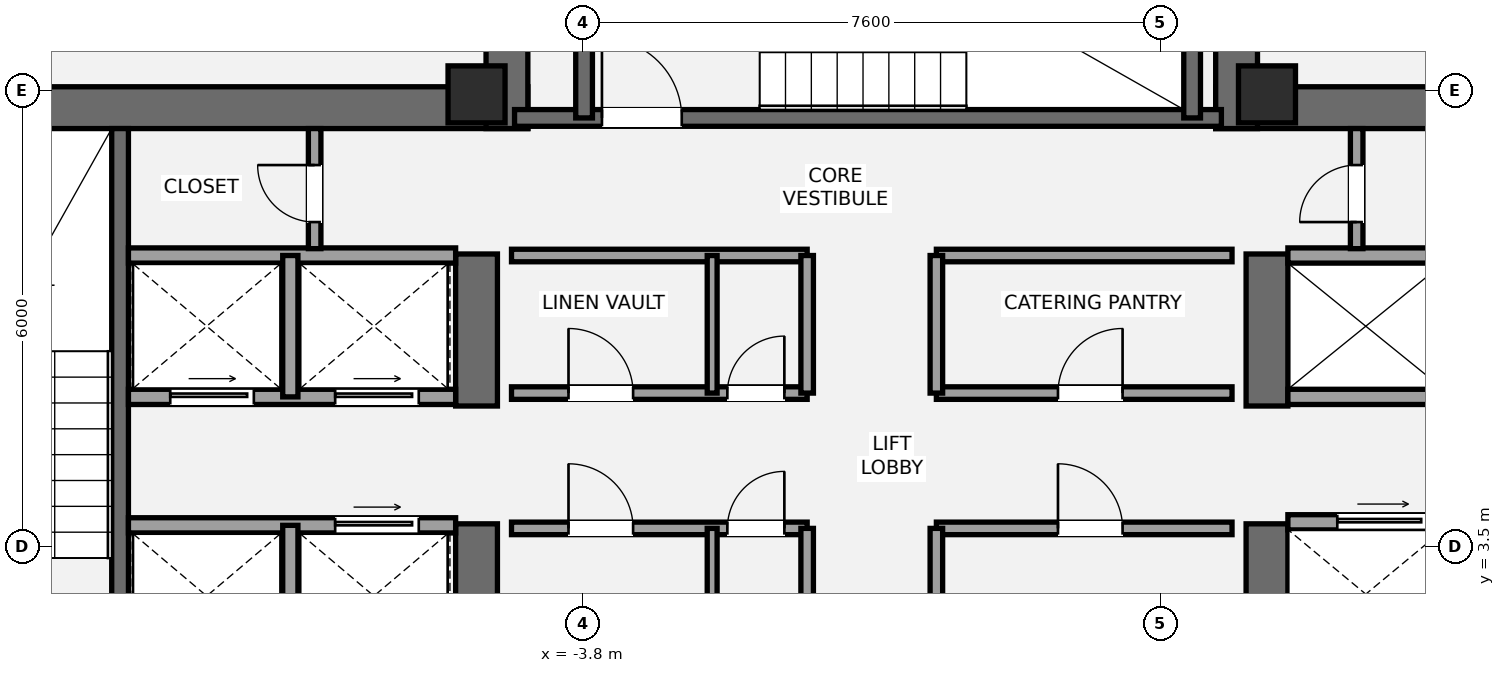
"""IFC4 building model, lengths in metres.
Left out: names, types, materials, properties, quantities, classifications, styles, units other than length and angle.
Written with IfcOpenShell. Run it as: python <this file> out.ifc"""

import sys

from ifc_helpers import new_model, si_unit, direction, frame, frame_2d, origin, origin_2d, place, context, subcontext, project, spatial, rectangle, extrude, element, fill, save


model = new_model("IFC4")
c1 = context("Model", 3, precision=1e-05, world=origin(), true_north=direction((0.0, 1.0)))
c2 = subcontext(c1, "Body", "Model", "MODEL_VIEW")
j1 = project(units=[si_unit("LENGTHUNIT", "METRE"), si_unit("PLANEANGLEUNIT", "RADIAN")], contexts=[c1])
p1 = place(None, origin())
s1 = spatial("IfcSite", under=j1, at=p1, CompositionType="ELEMENT")
p2 = place(p1, origin())
s2 = spatial("IfcBuilding", under=s1, at=p2, CompositionType="ELEMENT")
p3 = place(p2, frame((0.0, 0.0, 241.5)))
s3 = spatial("IfcBuildingStorey", under=s2, at=p3, CompositionType="ELEMENT", Elevation=241.5)
p4 = place(p3, frame((-13.7, 9.275, 0.0), z_axis=(0.0, 0.0, 1.0), x_axis=(1.0, 0.0, 0.0)))
e1 = element("IfcWall", 1, at=p4, inside=s3, PredefinedType="SHEAR", context=c2, shape_type="SweptSolid", body=[
    extrude(rectangle(XDim=9.175, YDim=0.55, at=frame_2d((4.587, 0.0))), origin(), (0.0, 0.0, 1.0), 3.15),
])
p5 = place(p3, frame((-5.2, 1.3, 0.0), z_axis=(0.0, 0.0, 1.0), x_axis=(0.0, 1.0, 0.0)))
e2 = element("IfcWall", 2, at=p5, inside=s3, PredefinedType="SHEAR", context=c2, shape_type="SweptSolid", body=[
    extrude(rectangle(XDim=2.5, YDim=0.55, at=frame_2d((1.25, 0.0))), origin(), (0.0, 0.0, 1.0), 3.15),
])
p6 = place(p3, frame((-5.2, 5.35, 0.0), z_axis=(0.0, 0.0, 1.0), x_axis=(0.0, 1.0, 0.0)))
e3 = element("IfcWall", 3, at=p6, inside=s3, PredefinedType="SHEAR", context=c2, shape_type="SweptSolid", body=[
    extrude(rectangle(XDim=2.0, YDim=0.55, at=frame_2d((1.0, 0.0))), origin(), (0.0, 0.0, 1.0), 3.15),
])
p7 = place(p3, frame((-9.89, 1.85, 0.0), z_axis=(0.0, 0.0, 1.0), x_axis=(0.0, 1.0, 0.0)))
e4 = element("IfcWall", 4, at=p7, inside=s3, PredefinedType="SHEAR", context=c2, shape_type="SweptSolid", body=[
    extrude(rectangle(XDim=7.15, YDim=0.22, at=frame_2d((3.575, 0.0))), origin(), (0.0, 0.0, 1.0), 3.15),
])
p8 = place(p3, frame((4.525, 9.275, 0.0), z_axis=(0.0, 0.0, 1.0), x_axis=(1.0, 0.0, 0.0)))
e5 = element("IfcWall", 5, at=p8, inside=s3, PredefinedType="SHEAR", context=c2, shape_type="SweptSolid", body=[
    extrude(rectangle(XDim=9.175, YDim=0.55, at=frame_2d((4.587, 0.0))), origin(), (0.0, 0.0, 1.0), 3.15),
])
p9 = place(p3, frame((5.2, 1.3, 0.0), z_axis=(0.0, 0.0, 1.0), x_axis=(0.0, 1.0, 0.0)))
e6 = element("IfcWall", 6, at=p9, inside=s3, PredefinedType="SHEAR", context=c2, shape_type="SweptSolid", body=[
    extrude(rectangle(XDim=2.5, YDim=0.55, at=frame_2d((1.25, 0.0))), origin(), (0.0, 0.0, 1.0), 3.15),
])
p10 = place(p3, frame((5.2, 5.35, 0.0), z_axis=(0.0, 0.0, 1.0), x_axis=(0.0, 1.0, 0.0)))
e7 = element("IfcWall", 7, at=p10, inside=s3, PredefinedType="SHEAR", context=c2, shape_type="SweptSolid", body=[
    extrude(rectangle(XDim=2.0, YDim=0.55, at=frame_2d((1.0, 0.0))), origin(), (0.0, 0.0, 1.0), 3.15),
])
for number, where, z_axis, x_axis in (
    (8, (-4.8, 9.0, 0.0), (0.0, 0.0, 1.0), (0.0, 1.0, 0.0)),
    (9, (4.8, 9.0, 0.0), (0.0, 0.0, 1.0), (0.0, 1.0, 0.0)),
):
    element("IfcWall", number, at=place(p3, frame(where, z_axis=z_axis, x_axis=x_axis)), inside=s3, PredefinedType="SHEAR", context=c2, shape_type="SweptSolid", body=[
        extrude(rectangle(XDim=3.95, YDim=0.55, at=frame_2d((1.975, 0.0))), origin(), (0.0, 0.0, 1.0), 3.15),
    ])
p11 = place(p3, frame((-4.7, 9.14, 0.0), z_axis=(0.0, 0.0, 1.0), x_axis=(1.0, 0.0, 0.0)))
e10 = element("IfcWall", 10, at=p11, inside=s3, PredefinedType="SHEAR", context=c2, shape_type="SweptSolid", body=[
    extrude(rectangle(XDim=9.3, YDim=0.22, at=frame_2d((4.65, 0.0))), origin(), (0.0, 0.0, 1.0), 3.15),
])
p12 = place(p11, frame((1.15, 0.0, 0.0)))
e11 = element("IfcOpeningElement", 11, at=p12, cuts=e10, PredefinedType="OPENING", context=c2, shape_type="SweptSolid", body=[
    extrude(rectangle(XDim=1.05, YDim=2.15, at=frame_2d((0.525, 1.075))), frame((0.0, 0.12, 0.0), z_axis=(0.0, -1.0, 0.0), x_axis=(1.0, 0.0, 0.0)), (0.0, 0.0, 1.0), 0.24),
])
for number, where, z_axis, x_axis in (
    (12, (-3.785, 9.14, 0.0), (0.0, 0.0, 1.0), (0.0, 1.0, 0.0)),
    (13, (4.215, 9.14, 0.0), (0.0, 0.0, 1.0), (0.0, 1.0, 0.0)),
):
    element("IfcWall", number, at=place(p3, frame(where, z_axis=z_axis, x_axis=x_axis)), inside=s3, PredefinedType="SHEAR", context=c2, shape_type="SweptSolid", body=[
        extrude(rectangle(XDim=3.26, YDim=0.22, at=frame_2d((1.63, 0.0))), origin(), (0.0, 0.0, 1.0), 3.15),
    ])
for number, where, z_axis, x_axis in (
    (14, (-5.2, 9.45, 0.0), (0.0, 0.0, 1.0), (1.0, 0.0, 0.0)),
    (15, (5.2, 9.45, 0.0), (0.0, 0.0, 1.0), (1.0, 0.0, 0.0)),
):
    element("IfcColumn", number, at=place(p3, frame(where, z_axis=z_axis, x_axis=x_axis)), inside=s3, PredefinedType="PILASTER", context=c2, shape_type="SweptSolid", body=[
        extrude(rectangle(XDim=0.75, YDim=0.75, at=origin_2d()), origin(), (0.0, 0.0, 1.0), 3.15),
    ])
p13 = place(p3, frame((-9.78, 3.78, 0.0), z_axis=(0.0, 0.0, 1.0), x_axis=(1.0, 0.0, 0.0)))
e16 = element("IfcWall", 16, at=p13, inside=s3, PredefinedType="SOLIDWALL", context=c2, shape_type="SweptSolid", body=[
    extrude(rectangle(XDim=4.305, YDim=0.2, at=frame_2d((2.152, 0.0))), origin(), (0.0, 0.0, 1.0), 2.97),
])
p14 = place(p13, frame((2.72, 0.0, 0.0)))
e17 = element("IfcOpeningElement", 17, at=p14, cuts=e16, PredefinedType="OPENING", context=c2, shape_type="SweptSolid", body=[
    extrude(rectangle(XDim=1.1, YDim=2.2, at=frame_2d((0.55, 1.1))), frame((0.0, 0.11, 0.0), z_axis=(0.0, -1.0, 0.0), x_axis=(1.0, 0.0, 0.0)), (0.0, 0.0, 1.0), 0.22),
])
p15 = place(p3, frame((-7.65, 1.85, 0.0), z_axis=(0.0, 0.0, 1.0), x_axis=(0.0, 1.0, 0.0)))
e18 = element("IfcWall", 18, at=p15, inside=s3, PredefinedType="SOLIDWALL", context=c2, shape_type="SweptSolid", body=[
    extrude(rectangle(XDim=1.93, YDim=0.2, at=frame_2d((0.965, 0.0))), origin(), (0.0, 0.0, 1.0), 2.97),
])
p16 = place(p3, frame((-9.78, 5.47, 0.0), z_axis=(0.0, 0.0, 1.0), x_axis=(1.0, 0.0, 0.0)))
e19 = element("IfcWall", 19, at=p16, inside=s3, PredefinedType="SOLIDWALL", context=c2, shape_type="SweptSolid", body=[
    extrude(rectangle(XDim=4.305, YDim=0.2, at=frame_2d((2.152, 0.0))), origin(), (0.0, 0.0, 1.0), 2.97),
])
p17 = place(p16, frame((0.55, 0.0, 0.0)))
e20 = element("IfcOpeningElement", 20, at=p17, cuts=e19, PredefinedType="OPENING", context=c2, shape_type="SweptSolid", body=[
    extrude(rectangle(XDim=1.1, YDim=2.2, at=frame_2d((0.55, 1.1))), frame((0.0, 0.11, 0.0), z_axis=(0.0, -1.0, 0.0), x_axis=(1.0, 0.0, 0.0)), (0.0, 0.0, 1.0), 0.22),
])
p18 = place(p16, frame((2.72, 0.0, 0.0)))
e21 = element("IfcOpeningElement", 21, at=p18, cuts=e19, PredefinedType="OPENING", context=c2, shape_type="SweptSolid", body=[
    extrude(rectangle(XDim=1.1, YDim=2.2, at=frame_2d((0.55, 1.1))), frame((0.0, 0.11, 0.0), z_axis=(0.0, -1.0, 0.0), x_axis=(1.0, 0.0, 0.0)), (0.0, 0.0, 1.0), 0.22),
])
p19 = place(p3, frame((-9.78, 7.33, 0.0), z_axis=(0.0, 0.0, 1.0), x_axis=(1.0, 0.0, 0.0)))
e22 = element("IfcWall", 22, at=p19, inside=s3, PredefinedType="SOLIDWALL", context=c2, shape_type="SweptSolid", body=[
    extrude(rectangle(XDim=4.305, YDim=0.2, at=frame_2d((2.152, 0.0))), origin(), (0.0, 0.0, 1.0), 2.97),
])
p20 = place(p3, frame((-7.65, 5.47, 0.0), z_axis=(0.0, 0.0, 1.0), x_axis=(0.0, 1.0, 0.0)))
e23 = element("IfcWall", 23, at=p20, inside=s3, PredefinedType="SOLIDWALL", context=c2, shape_type="SweptSolid", body=[
    extrude(rectangle(XDim=1.86, YDim=0.2, at=frame_2d((0.93, 0.0))), origin(), (0.0, 0.0, 1.0), 2.97),
])
p21 = place(p3, frame((5.475, 3.82, 0.0), z_axis=(0.0, 0.0, 1.0), x_axis=(1.0, 0.0, 0.0)))
e24 = element("IfcWall", 24, at=p21, inside=s3, PredefinedType="SOLIDWALL", context=c2, shape_type="SweptSolid", body=[
    extrude(rectangle(XDim=4.305, YDim=0.2, at=frame_2d((2.152, 0.0))), origin(), (0.0, 0.0, 1.0), 2.97),
])
p22 = place(p21, frame((0.65, 0.0, 0.0)))
e25 = element("IfcOpeningElement", 25, at=p22, cuts=e24, PredefinedType="OPENING", context=c2, shape_type="SweptSolid", body=[
    extrude(rectangle(XDim=1.2, YDim=2.2, at=frame_2d((0.6, 1.1))), frame((0.0, 0.11, 0.0), z_axis=(0.0, -1.0, 0.0), x_axis=(1.0, 0.0, 0.0)), (0.0, 0.0, 1.0), 0.22),
])
for number, where, z_axis, x_axis in (
    (26, (5.475, 5.47, 0.0), (0.0, 0.0, 1.0), (1.0, 0.0, 0.0)),
    (27, (5.475, 7.33, 0.0), (0.0, 0.0, 1.0), (1.0, 0.0, 0.0)),
):
    element("IfcWall", number, at=place(p3, frame(where, z_axis=z_axis, x_axis=x_axis)), inside=s3, PredefinedType="SOLIDWALL", context=c2, shape_type="SweptSolid", body=[
        extrude(rectangle(XDim=4.305, YDim=0.2, at=frame_2d((2.152, 0.0))), origin(), (0.0, 0.0, 1.0), 2.97),
    ])
p23 = place(p3, frame((-4.74, 3.74, 0.0), z_axis=(0.0, 0.0, 1.0), x_axis=(1.0, 0.0, 0.0)))
e28 = element("IfcWall", 28, at=p23, inside=s3, PredefinedType="PARTITIONING", context=c2, shape_type="SweptSolid", body=[
    extrude(rectangle(XDim=3.89, YDim=0.165, at=frame_2d((1.945, 0.0))), origin(), (0.0, 0.0, 1.0), 2.97),
])
p24 = place(p23, frame((0.75, 0.0, 0.0)))
e29 = element("IfcOpeningElement", 29, at=p24, cuts=e28, PredefinedType="OPENING", context=c2, shape_type="SweptSolid", body=[
    extrude(rectangle(XDim=0.85, YDim=2.1, at=frame_2d((0.425, 1.05))), frame((0.0, 0.093, 0.0), z_axis=(0.0, -1.0, 0.0), x_axis=(1.0, 0.0, 0.0)), (0.0, 0.0, 1.0), 0.185),
])
p25 = place(p23, frame((2.84, 0.0, 0.0)))
e30 = element("IfcOpeningElement", 30, at=p25, cuts=e28, PredefinedType="OPENING", context=c2, shape_type="SweptSolid", body=[
    extrude(rectangle(XDim=0.75, YDim=2.1, at=frame_2d((0.375, 1.05))), frame((0.0, 0.093, 0.0), z_axis=(0.0, -1.0, 0.0), x_axis=(1.0, 0.0, 0.0)), (0.0, 0.0, 1.0), 0.185),
])
p26 = place(p3, frame((-0.85, 1.92, 0.0), z_axis=(0.0, 0.0, 1.0), x_axis=(0.0, 1.0, 0.0)))
e31 = element("IfcWall", 31, at=p26, inside=s3, PredefinedType="PARTITIONING", context=c2, shape_type="SweptSolid", body=[
    extrude(rectangle(XDim=1.82, YDim=0.165, at=frame_2d((0.91, 0.0))), origin(), (0.0, 0.0, 1.0), 2.97),
])
p27 = place(p3, frame((0.85, 3.74, 0.0), z_axis=(0.0, 0.0, 1.0), x_axis=(1.0, 0.0, 0.0)))
e32 = element("IfcWall", 32, at=p27, inside=s3, PredefinedType="PARTITIONING", context=c2, shape_type="SweptSolid", body=[
    extrude(rectangle(XDim=3.89, YDim=0.165, at=frame_2d((1.945, 0.0))), origin(), (0.0, 0.0, 1.0), 2.97),
])
p28 = place(p27, frame((1.6, 0.0, 0.0)))
e33 = element("IfcOpeningElement", 33, at=p28, cuts=e32, PredefinedType="OPENING", context=c2, shape_type="SweptSolid", body=[
    extrude(rectangle(XDim=0.85, YDim=2.1, at=frame_2d((0.425, 1.05))), frame((0.0, 0.093, 0.0), z_axis=(0.0, -1.0, 0.0), x_axis=(1.0, 0.0, 0.0)), (0.0, 0.0, 1.0), 0.185),
])
p29 = place(p3, frame((0.85, 1.92, 0.0), z_axis=(0.0, 0.0, 1.0), x_axis=(0.0, 1.0, 0.0)))
e34 = element("IfcWall", 34, at=p29, inside=s3, PredefinedType="PARTITIONING", context=c2, shape_type="SweptSolid", body=[
    extrude(rectangle(XDim=1.82, YDim=0.165, at=frame_2d((0.91, 0.0))), origin(), (0.0, 0.0, 1.0), 2.97),
])
p30 = place(p3, frame((-2.1, 1.92, 0.0), z_axis=(0.0, 0.0, 1.0), x_axis=(0.0, 1.0, 0.0)))
e35 = element("IfcWall", 35, at=p30, inside=s3, PredefinedType="PARTITIONING", context=c2, shape_type="SweptSolid", body=[
    extrude(rectangle(XDim=1.82, YDim=0.13, at=frame_2d((0.91, 0.0))), origin(), (0.0, 0.0, 1.0), 2.97),
])
p31 = place(p3, frame((-4.74, 5.52, 0.0), z_axis=(0.0, 0.0, 1.0), x_axis=(1.0, 0.0, 0.0)))
e36 = element("IfcWall", 36, at=p31, inside=s3, PredefinedType="PARTITIONING", context=c2, shape_type="SweptSolid", body=[
    extrude(rectangle(XDim=3.89, YDim=0.165, at=frame_2d((1.945, 0.0))), origin(), (0.0, 0.0, 1.0), 2.97),
])
p32 = place(p31, frame((0.75, 0.0, 0.0)))
e37 = element("IfcOpeningElement", 37, at=p32, cuts=e36, PredefinedType="OPENING", context=c2, shape_type="SweptSolid", body=[
    extrude(rectangle(XDim=0.85, YDim=2.1, at=frame_2d((0.425, 1.05))), frame((0.0, 0.093, 0.0), z_axis=(0.0, -1.0, 0.0), x_axis=(1.0, 0.0, 0.0)), (0.0, 0.0, 1.0), 0.185),
])
p33 = place(p31, frame((2.84, 0.0, 0.0)))
e38 = element("IfcOpeningElement", 38, at=p33, cuts=e36, PredefinedType="OPENING", context=c2, shape_type="SweptSolid", body=[
    extrude(rectangle(XDim=0.75, YDim=2.1, at=frame_2d((0.375, 1.05))), frame((0.0, 0.093, 0.0), z_axis=(0.0, -1.0, 0.0), x_axis=(1.0, 0.0, 0.0)), (0.0, 0.0, 1.0), 0.185),
])
p34 = place(p3, frame((-4.74, 7.33, 0.0), z_axis=(0.0, 0.0, 1.0), x_axis=(1.0, 0.0, 0.0)))
e39 = element("IfcWall", 39, at=p34, inside=s3, PredefinedType="PARTITIONING", context=c2, shape_type="SweptSolid", body=[
    extrude(rectangle(XDim=3.89, YDim=0.165, at=frame_2d((1.945, 0.0))), origin(), (0.0, 0.0, 1.0), 2.97),
])
p35 = place(p3, frame((-0.85, 5.52, 0.0), z_axis=(0.0, 0.0, 1.0), x_axis=(0.0, 1.0, 0.0)))
e40 = element("IfcWall", 40, at=p35, inside=s3, PredefinedType="PARTITIONING", context=c2, shape_type="SweptSolid", body=[
    extrude(rectangle(XDim=1.81, YDim=0.165, at=frame_2d((0.905, 0.0))), origin(), (0.0, 0.0, 1.0), 2.97),
])
p36 = place(p3, frame((0.85, 5.52, 0.0), z_axis=(0.0, 0.0, 1.0), x_axis=(1.0, 0.0, 0.0)))
e41 = element("IfcWall", 41, at=p36, inside=s3, PredefinedType="PARTITIONING", context=c2, shape_type="SweptSolid", body=[
    extrude(rectangle(XDim=3.89, YDim=0.165, at=frame_2d((1.945, 0.0))), origin(), (0.0, 0.0, 1.0), 2.97),
])
p37 = place(p36, frame((1.6, 0.0, 0.0)))
e42 = element("IfcOpeningElement", 42, at=p37, cuts=e41, PredefinedType="OPENING", context=c2, shape_type="SweptSolid", body=[
    extrude(rectangle(XDim=0.85, YDim=2.1, at=frame_2d((0.425, 1.05))), frame((0.0, 0.093, 0.0), z_axis=(0.0, -1.0, 0.0), x_axis=(1.0, 0.0, 0.0)), (0.0, 0.0, 1.0), 0.185),
])
p38 = place(p3, frame((0.85, 7.33, 0.0), z_axis=(0.0, 0.0, 1.0), x_axis=(1.0, 0.0, 0.0)))
e43 = element("IfcWall", 43, at=p38, inside=s3, PredefinedType="PARTITIONING", context=c2, shape_type="SweptSolid", body=[
    extrude(rectangle(XDim=3.89, YDim=0.165, at=frame_2d((1.945, 0.0))), origin(), (0.0, 0.0, 1.0), 2.97),
])
p39 = place(p3, frame((0.85, 5.52, 0.0), z_axis=(0.0, 0.0, 1.0), x_axis=(0.0, 1.0, 0.0)))
e44 = element("IfcWall", 44, at=p39, inside=s3, PredefinedType="PARTITIONING", context=c2, shape_type="SweptSolid", body=[
    extrude(rectangle(XDim=1.81, YDim=0.165, at=frame_2d((0.905, 0.0))), origin(), (0.0, 0.0, 1.0), 2.97),
])
p40 = place(p3, frame((-2.1, 5.52, 0.0), z_axis=(0.0, 0.0, 1.0), x_axis=(0.0, 1.0, 0.0)))
e45 = element("IfcWall", 45, at=p40, inside=s3, PredefinedType="PARTITIONING", context=c2, shape_type="SweptSolid", body=[
    extrude(rectangle(XDim=1.81, YDim=0.13, at=frame_2d((0.905, 0.0))), origin(), (0.0, 0.0, 1.0), 2.97),
])
p41 = place(p3, frame((-7.33, 7.42, 0.0), z_axis=(0.0, 0.0, 1.0), x_axis=(0.0, 1.0, 0.0)))
e46 = element("IfcWall", 46, at=p41, inside=s3, PredefinedType="PARTITIONING", context=c2, shape_type="SweptSolid", body=[
    extrude(rectangle(XDim=1.58, YDim=0.165, at=frame_2d((0.79, 0.0))), origin(), (0.0, 0.0, 1.0), 2.97),
])
p42 = place(p41, frame((0.35, 0.0, 0.0)))
e47 = element("IfcOpeningElement", 47, at=p42, cuts=e46, PredefinedType="OPENING", context=c2, shape_type="SweptSolid", body=[
    extrude(rectangle(XDim=0.75, YDim=2.1, at=frame_2d((0.375, 1.05))), frame((0.0, 0.093, 0.0), z_axis=(0.0, -1.0, 0.0), x_axis=(1.0, 0.0, 0.0)), (0.0, 0.0, 1.0), 0.185),
])
p43 = place(p3, frame((6.38, 7.42, 0.0), z_axis=(0.0, 0.0, 1.0), x_axis=(0.0, 1.0, 0.0)))
e48 = element("IfcWall", 48, at=p43, inside=s3, PredefinedType="PARTITIONING", context=c2, shape_type="SweptSolid", body=[
    extrude(rectangle(XDim=1.58, YDim=0.165, at=frame_2d((0.79, 0.0))), origin(), (0.0, 0.0, 1.0), 2.97),
])
p44 = place(p43, frame((0.35, 0.0, 0.0)))
e49 = element("IfcOpeningElement", 49, at=p44, cuts=e48, PredefinedType="OPENING", context=c2, shape_type="SweptSolid", body=[
    extrude(rectangle(XDim=0.75, YDim=2.1, at=frame_2d((0.375, 1.05))), frame((0.0, 0.093, 0.0), z_axis=(0.0, -1.0, 0.0), x_axis=(1.0, 0.0, 0.0)), (0.0, 0.0, 1.0), 0.185),
])
p45 = place(p12, origin())
e50 = element("IfcDoor", 50, at=p45, inside=s3, OperationType="SINGLE_SWING_LEFT", PredefinedType="DOOR", context=c2, shape_type="SweptSolid", body=[
    extrude(rectangle(XDim=1.05, YDim=2.15, at=frame_2d((0.525, 1.075))), frame((0.0, 0.025, 0.0), z_axis=(0.0, -1.0, 0.0), x_axis=(1.0, 0.0, 0.0)), (0.0, 0.0, 1.0), 0.05),
])
fill(e11, e50)
p46 = place(p17, origin())
e51 = element("IfcDoor", 51, at=p46, inside=s3, OperationType="SLIDING_TO_LEFT", PredefinedType="DOOR", context=c2, shape_type="SweptSolid", body=[
    extrude(rectangle(XDim=1.1, YDim=2.2, at=frame_2d((0.55, 1.1))), frame((0.0, 0.025, 0.0), z_axis=(0.0, -1.0, 0.0), x_axis=(1.0, 0.0, 0.0)), (0.0, 0.0, 1.0), 0.05),
])
fill(e20, e51)
p47 = place(p18, origin())
e52 = element("IfcDoor", 52, at=p47, inside=s3, OperationType="SLIDING_TO_LEFT", PredefinedType="DOOR", context=c2, shape_type="SweptSolid", body=[
    extrude(rectangle(XDim=1.1, YDim=2.2, at=frame_2d((0.55, 1.1))), frame((0.0, 0.025, 0.0), z_axis=(0.0, -1.0, 0.0), x_axis=(1.0, 0.0, 0.0)), (0.0, 0.0, 1.0), 0.05),
])
fill(e21, e52)
p48 = place(p14, origin())
e53 = element("IfcDoor", 53, at=p48, inside=s3, OperationType="SLIDING_TO_LEFT", PredefinedType="DOOR", context=c2, shape_type="SweptSolid", body=[
    extrude(rectangle(XDim=1.1, YDim=2.2, at=frame_2d((0.55, 1.1))), frame((0.0, 0.025, 0.0), z_axis=(0.0, -1.0, 0.0), x_axis=(1.0, 0.0, 0.0)), (0.0, 0.0, 1.0), 0.05),
])
fill(e17, e53)
p49 = place(p22, origin())
e54 = element("IfcDoor", 54, at=p49, inside=s3, OperationType="SLIDING_TO_RIGHT", PredefinedType="DOOR", context=c2, shape_type="SweptSolid", body=[
    extrude(rectangle(XDim=1.2, YDim=2.2, at=frame_2d((0.6, 1.1))), frame((0.0, 0.025, 0.0), z_axis=(0.0, -1.0, 0.0), x_axis=(1.0, 0.0, 0.0)), (0.0, 0.0, 1.0), 0.05),
])
fill(e25, e54)
p50 = place(p24, origin())
e55 = element("IfcDoor", 55, at=p50, inside=s3, OperationType="SINGLE_SWING_LEFT", PredefinedType="DOOR", context=c2, shape_type="SweptSolid", body=[
    extrude(rectangle(XDim=0.85, YDim=2.1, at=frame_2d((0.425, 1.05))), frame((0.0, 0.025, 0.0), z_axis=(0.0, -1.0, 0.0), x_axis=(1.0, 0.0, 0.0)), (0.0, 0.0, 1.0), 0.05),
])
fill(e29, e55)
p51 = place(p25, origin())
e56 = element("IfcDoor", 56, at=p51, inside=s3, OperationType="SINGLE_SWING_RIGHT", PredefinedType="DOOR", context=c2, shape_type="SweptSolid", body=[
    extrude(rectangle(XDim=0.75, YDim=2.1, at=frame_2d((0.375, 1.05))), frame((0.0, 0.025, 0.0), z_axis=(0.0, -1.0, 0.0), x_axis=(1.0, 0.0, 0.0)), (0.0, 0.0, 1.0), 0.05),
])
fill(e30, e56)
p52 = place(p28, origin())
e57 = element("IfcDoor", 57, at=p52, inside=s3, OperationType="SINGLE_SWING_LEFT", PredefinedType="DOOR", context=c2, shape_type="SweptSolid", body=[
    extrude(rectangle(XDim=0.85, YDim=2.1, at=frame_2d((0.425, 1.05))), frame((0.0, 0.025, 0.0), z_axis=(0.0, -1.0, 0.0), x_axis=(1.0, 0.0, 0.0)), (0.0, 0.0, 1.0), 0.05),
])
fill(e33, e57)
p53 = place(p32, origin())
e58 = element("IfcDoor", 58, at=p53, inside=s3, OperationType="SINGLE_SWING_LEFT", PredefinedType="DOOR", context=c2, shape_type="SweptSolid", body=[
    extrude(rectangle(XDim=0.85, YDim=2.1, at=frame_2d((0.425, 1.05))), frame((0.0, 0.025, 0.0), z_axis=(0.0, -1.0, 0.0), x_axis=(1.0, 0.0, 0.0)), (0.0, 0.0, 1.0), 0.05),
])
fill(e37, e58)
p54 = place(p33, origin())
e59 = element("IfcDoor", 59, at=p54, inside=s3, OperationType="SINGLE_SWING_RIGHT", PredefinedType="DOOR", context=c2, shape_type="SweptSolid", body=[
    extrude(rectangle(XDim=0.75, YDim=2.1, at=frame_2d((0.375, 1.05))), frame((0.0, 0.025, 0.0), z_axis=(0.0, -1.0, 0.0), x_axis=(1.0, 0.0, 0.0)), (0.0, 0.0, 1.0), 0.05),
])
fill(e38, e59)
p55 = place(p37, origin())
e60 = element("IfcDoor", 60, at=p55, inside=s3, OperationType="SINGLE_SWING_RIGHT", PredefinedType="DOOR", context=c2, shape_type="SweptSolid", body=[
    extrude(rectangle(XDim=0.85, YDim=2.1, at=frame_2d((0.425, 1.05))), frame((0.0, 0.025, 0.0), z_axis=(0.0, -1.0, 0.0), x_axis=(1.0, 0.0, 0.0)), (0.0, 0.0, 1.0), 0.05),
])
fill(e42, e60)
p56 = place(p42, origin())
e61 = element("IfcDoor", 61, at=p56, inside=s3, OperationType="SINGLE_SWING_RIGHT", PredefinedType="DOOR", context=c2, shape_type="SweptSolid", body=[
    extrude(rectangle(XDim=0.75, YDim=2.1, at=frame_2d((0.375, 1.05))), frame((0.0, 0.025, 0.0), z_axis=(0.0, -1.0, 0.0), x_axis=(1.0, 0.0, 0.0)), (0.0, 0.0, 1.0), 0.05),
])
fill(e47, e61)
p57 = place(p44, origin())
e62 = element("IfcDoor", 62, at=p57, inside=s3, OperationType="SINGLE_SWING_LEFT", PredefinedType="DOOR", context=c2, shape_type="SweptSolid", body=[
    extrude(rectangle(XDim=0.75, YDim=2.1, at=frame_2d((0.375, 1.05))), frame((0.0, 0.025, 0.0), z_axis=(0.0, -1.0, 0.0), x_axis=(1.0, 0.0, 0.0)), (0.0, 0.0, 1.0), 0.05),
])
fill(e49, e62)
save(model, sys.argv[1])
